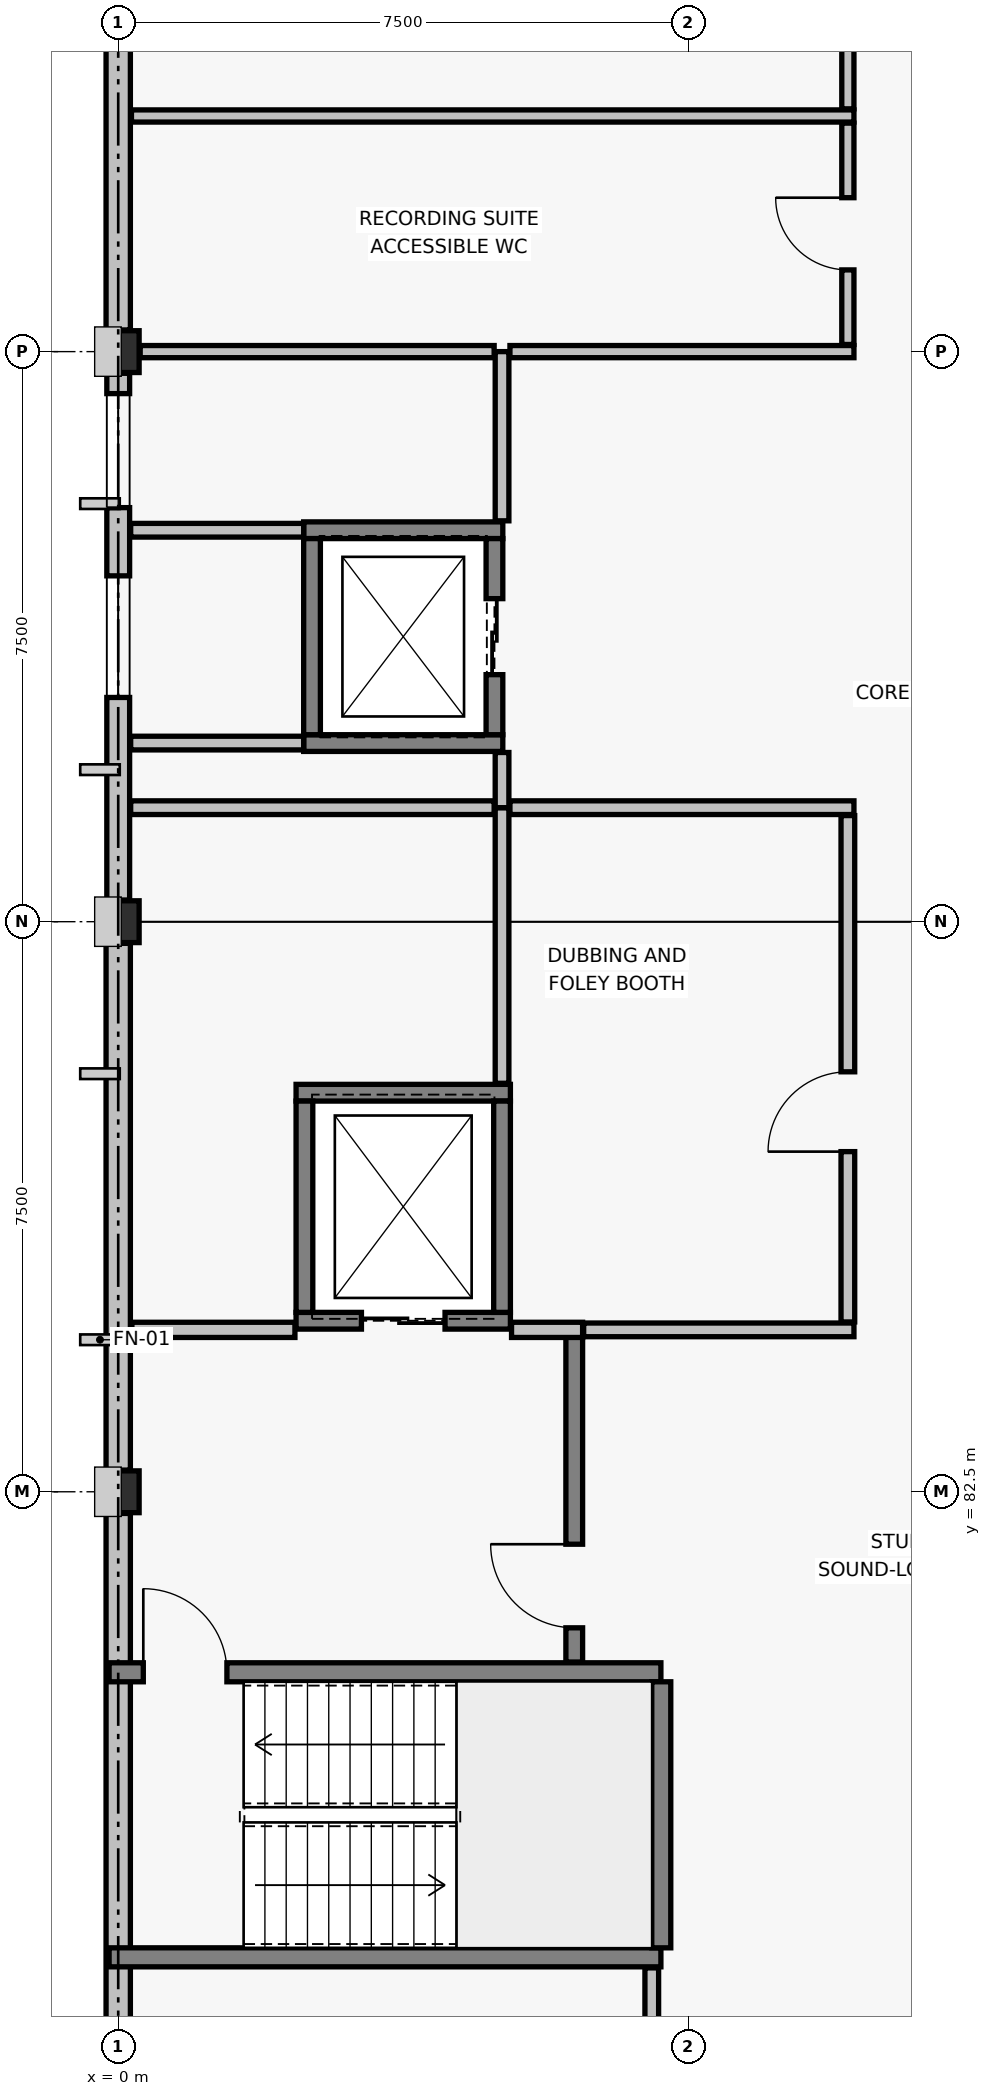
"""IFC4 building model, lengths in metres.
Left out: names, types, materials, properties, quantities, classifications, styles, units other than length and angle.
Written with IfcOpenShell. Run it as: python <this file> out.ifc"""

import sys

from ifc_helpers import new_model, si_unit, direction, frame, frame_2d, origin, origin_2d, place, context, subcontext, project, spatial, rectangle, extrude, element, fill, save


model = new_model("IFC4")
c1 = context("Model", 3, precision=1e-05, world=origin(), true_north=direction((0.0, 1.0)))
c2 = subcontext(c1, "Body", "Model", "MODEL_VIEW")
j1 = project(units=[si_unit("LENGTHUNIT", "METRE"), si_unit("PLANEANGLEUNIT", "RADIAN")], contexts=[c1])
p1 = place(None, origin())
s1 = spatial("IfcSite", under=j1, at=p1, CompositionType="ELEMENT")
p2 = place(p1, origin())
s2 = spatial("IfcBuilding", under=s1, at=p2, CompositionType="ELEMENT")
p3 = place(p2, frame((0.0, 0.0, 13.2)))
s3 = spatial("IfcBuildingStorey", under=s2, at=p3, CompositionType="ELEMENT", Elevation=13.2)
for number, where, z_axis, x_axis in (
    (1, (0.0, 82.5, 0.0), (0.0, 0.0, 1.0), (1.0, 0.0, 0.0)),
    (2, (0.0, 90.0, 0.0), (0.0, 0.0, 1.0), (1.0, 0.0, 0.0)),
    (3, (0.0, 97.5, 0.0), (0.0, 0.0, 1.0), (1.0, 0.0, 0.0)),
):
    element("IfcColumn", number, at=place(p3, frame(where, z_axis=z_axis, x_axis=x_axis)), inside=s3, PredefinedType="COLUMN", context=c2, shape_type="SweptSolid", body=[
        extrude(rectangle(XDim=0.55, YDim=0.55, at=origin_2d()), origin(), (0.0, 0.0, 1.0), 3.9),
    ])
for number, where, z_axis, x_axis in (
    (4, (0.0, 75.285, 0.0), (0.0, 0.0, 1.0), (0.0, 1.0, 0.0)),
    (5, (0.0, 82.785, 0.0), (0.0, 0.0, 1.0), (0.0, 1.0, 0.0)),
):
    element("IfcWall", number, at=place(p3, frame(where, z_axis=z_axis, x_axis=x_axis)), inside=s3, PredefinedType="SOLIDWALL", context=c2, shape_type="SweptSolid", body=[
        extrude(rectangle(XDim=6.93, YDim=0.32, at=frame_2d((3.465, 0.0))), origin(), (0.0, 0.0, 1.0), 2.59),
    ])
p4 = place(p3, frame((0.0, 90.285, 0.0), z_axis=(0.0, 0.0, 1.0), x_axis=(0.0, 1.0, 0.0)))
e6 = element("IfcWall", 6, at=p4, inside=s3, PredefinedType="SOLIDWALL", context=c2, shape_type="SweptSolid", body=[
    extrude(rectangle(XDim=6.93, YDim=0.3, at=frame_2d((3.465, 0.0))), origin(), (0.0, 0.0, 1.0), 2.59),
])
p5 = place(p4, frame((2.665, 0.0, 0.6)))
e7 = element("IfcOpeningElement", 7, at=p5, cuts=e6, PredefinedType="OPENING", context=c2, shape_type="SweptSolid", body=[
    extrude(rectangle(XDim=1.6, YDim=1.3, at=frame_2d((0.8, 0.65))), frame((0.0, 0.16, 0.0), z_axis=(0.0, -1.0, 0.0), x_axis=(1.0, 0.0, 0.0)), (0.0, 0.0, 1.0), 0.32),
])
p6 = place(p4, frame((5.163, 0.0, 0.6)))
e8 = element("IfcOpeningElement", 8, at=p6, cuts=e6, PredefinedType="OPENING", context=c2, shape_type="SweptSolid", body=[
    extrude(rectangle(XDim=1.5, YDim=1.2, at=frame_2d((0.75, 0.6))), frame((0.0, 0.16, 0.0), z_axis=(0.0, -1.0, 0.0), x_axis=(1.0, 0.0, 0.0)), (0.0, 0.0, 1.0), 0.32),
])
p7 = place(p3, frame((0.0, 97.785, 0.0), z_axis=(0.0, 0.0, 1.0), x_axis=(0.0, 1.0, 0.0)))
e9 = element("IfcWall", 9, at=p7, inside=s3, PredefinedType="SOLIDWALL", context=c2, shape_type="SweptSolid", body=[
    extrude(rectangle(XDim=6.93, YDim=0.32, at=frame_2d((3.465, 0.0))), origin(), (0.0, 0.0, 1.0), 2.59),
])
p8 = place(p3, frame((-0.12, 76.375, 0.0), z_axis=(0.0, 0.0, 1.0), x_axis=(1.0, 0.0, 0.0)))
e10 = element("IfcWall", 10, at=p8, inside=s3, PredefinedType="SOLIDWALL", context=c2, shape_type="SweptSolid", body=[
    extrude(rectangle(XDim=7.26, YDim=0.25, at=frame_2d((3.63, 0.0))), origin(), (0.0, 0.0, 1.0), 3.62),
])
p9 = place(p3, frame((-0.12, 80.125, 0.0), z_axis=(0.0, 0.0, 1.0), x_axis=(1.0, 0.0, 0.0)))
e11 = element("IfcWall", 11, at=p9, inside=s3, PredefinedType="SOLIDWALL", context=c2, shape_type="SweptSolid", body=[
    extrude(rectangle(XDim=7.26, YDim=0.25, at=frame_2d((3.63, 0.0))), origin(), (0.0, 0.0, 1.0), 3.62),
])
p10 = place(p9, frame((0.45, 0.0, 0.0)))
e12 = element("IfcOpeningElement", 12, at=p10, cuts=e11, PredefinedType="OPENING", context=c2, shape_type="SweptSolid", body=[
    extrude(rectangle(XDim=1.1, YDim=2.15, at=frame_2d((0.55, 1.075))), frame((0.0, 0.135, 0.0), z_axis=(0.0, -1.0, 0.0), x_axis=(1.0, 0.0, 0.0)), (0.0, 0.0, 1.0), 0.27),
])
p11 = place(p3, frame((7.145, 76.5, 0.0), z_axis=(0.0, 0.0, 1.0), x_axis=(0.0, 1.0, 0.0)))
e13 = element("IfcWall", 13, at=p11, inside=s3, PredefinedType="SOLIDWALL", context=c2, shape_type="SweptSolid", body=[
    extrude(rectangle(XDim=3.5, YDim=0.25, at=frame_2d((1.75, 0.0))), origin(), (0.0, 0.0, 1.0), 3.62),
])
for number, where, z_axis, x_axis in (
    (14, (2.44, 92.35, 0.0), (0.0, 0.0, 1.0), (1.0, 0.0, 0.0)),
    (15, (2.44, 95.15, 0.0), (0.0, 0.0, 1.0), (1.0, 0.0, 0.0)),
):
    element("IfcWall", number, at=place(p3, frame(where, z_axis=z_axis, x_axis=x_axis)), inside=s3, PredefinedType="SOLIDWALL", context=c2, shape_type="SweptSolid", body=[
        extrude(rectangle(XDim=2.62, YDim=0.22, at=frame_2d((1.31, 0.0))), origin(), (0.0, 0.0, 1.0), 3.62),
    ])
p12 = place(p3, frame((2.55, 92.46, 0.0), z_axis=(0.0, 0.0, 1.0), x_axis=(0.0, 1.0, 0.0)))
e16 = element("IfcWall", 16, at=p12, inside=s3, PredefinedType="SOLIDWALL", context=c2, shape_type="SweptSolid", body=[
    extrude(rectangle(XDim=2.58, YDim=0.22, at=frame_2d((1.29, 0.0))), origin(), (0.0, 0.0, 1.0), 3.62),
])
p13 = place(p3, frame((4.95, 92.46, 0.0), z_axis=(0.0, 0.0, 1.0), x_axis=(0.0, 1.0, 0.0)))
e17 = element("IfcWall", 17, at=p13, inside=s3, PredefinedType="SOLIDWALL", context=c2, shape_type="SweptSolid", body=[
    extrude(rectangle(XDim=2.58, YDim=0.22, at=frame_2d((1.29, 0.0))), origin(), (0.0, 0.0, 1.0), 3.62),
])
p14 = place(p13, frame((0.79, 0.0, 0.0)))
e18 = element("IfcOpeningElement", 18, at=p14, cuts=e17, PredefinedType="OPENING", context=c2, shape_type="SweptSolid", body=[
    extrude(rectangle(XDim=1.0, YDim=2.15, at=frame_2d((0.5, 1.075))), frame((0.0, 0.12, 0.0), z_axis=(0.0, -1.0, 0.0), x_axis=(1.0, 0.0, 0.0)), (0.0, 0.0, 1.0), 0.24),
])
p15 = place(p3, frame((2.34, 84.75, 0.0), z_axis=(0.0, 0.0, 1.0), x_axis=(1.0, 0.0, 0.0)))
e19 = element("IfcWall", 19, at=p15, inside=s3, PredefinedType="SOLIDWALL", context=c2, shape_type="SweptSolid", body=[
    extrude(rectangle(XDim=2.82, YDim=0.22, at=frame_2d((1.41, 0.0))), origin(), (0.0, 0.0, 1.0), 3.62),
])
p16 = place(p15, frame((0.86, 0.0, 0.0)))
e20 = element("IfcOpeningElement", 20, at=p16, cuts=e19, PredefinedType="OPENING", context=c2, shape_type="SweptSolid", body=[
    extrude(rectangle(XDim=1.1, YDim=2.15, at=frame_2d((0.55, 1.075))), frame((0.0, 0.12, 0.0), z_axis=(0.0, -1.0, 0.0), x_axis=(1.0, 0.0, 0.0)), (0.0, 0.0, 1.0), 0.24),
])
p17 = place(p3, frame((2.34, 87.75, 0.0), z_axis=(0.0, 0.0, 1.0), x_axis=(1.0, 0.0, 0.0)))
e21 = element("IfcWall", 21, at=p17, inside=s3, PredefinedType="SOLIDWALL", context=c2, shape_type="SweptSolid", body=[
    extrude(rectangle(XDim=2.82, YDim=0.22, at=frame_2d((1.41, 0.0))), origin(), (0.0, 0.0, 1.0), 3.62),
])
for number, where, z_axis, x_axis in (
    (22, (2.45, 84.86, 0.0), (0.0, 0.0, 1.0), (0.0, 1.0, 0.0)),
    (23, (5.05, 84.86, 0.0), (0.0, 0.0, 1.0), (0.0, 1.0, 0.0)),
):
    element("IfcWall", number, at=place(p3, frame(where, z_axis=z_axis, x_axis=x_axis)), inside=s3, PredefinedType="SOLIDWALL", context=c2, shape_type="SweptSolid", body=[
        extrude(rectangle(XDim=2.78, YDim=0.22, at=frame_2d((1.39, 0.0))), origin(), (0.0, 0.0, 1.0), 3.62),
    ])
p18 = place(p3, frame((6.0, 80.26, 0.0), z_axis=(0.0, 0.0, 1.0), x_axis=(0.0, 1.0, 0.0)))
e24 = element("IfcWall", 24, at=p18, inside=s3, PredefinedType="SOLIDWALL", context=c2, shape_type="SweptSolid", body=[
    extrude(rectangle(XDim=4.37, YDim=0.22, at=frame_2d((2.185, 0.0))), origin(), (0.0, 0.0, 1.0), 3.62),
])
p19 = place(p18, frame((0.45, 0.0, 0.0)))
e25 = element("IfcOpeningElement", 25, at=p19, cuts=e24, PredefinedType="OPENING", context=c2, shape_type="SweptSolid", body=[
    extrude(rectangle(XDim=1.1, YDim=2.15, at=frame_2d((0.55, 1.075))), frame((0.0, 0.12, 0.0), z_axis=(0.0, -1.0, 0.0), x_axis=(1.0, 0.0, 0.0)), (0.0, 0.0, 1.0), 0.24),
])
p20 = place(p3, frame((0.18, 84.63, 0.0), z_axis=(0.0, 0.0, 1.0), x_axis=(1.0, 0.0, 0.0)))
e26 = element("IfcWall", 26, at=p20, inside=s3, PredefinedType="PARTITIONING", context=c2, shape_type="SweptSolid", body=[
    extrude(rectangle(XDim=2.145, YDim=0.2, at=frame_2d((1.073, 0.0))), origin(), (0.0, 0.0, 1.0), 2.85),
])
p21 = place(p3, frame((5.175, 84.63, 0.0), z_axis=(0.0, 0.0, 1.0), x_axis=(1.0, 0.0, 0.0)))
e27 = element("IfcWall", 27, at=p21, inside=s3, PredefinedType="PARTITIONING", context=c2, shape_type="SweptSolid", body=[
    extrude(rectangle(XDim=0.935, YDim=0.2, at=frame_2d((0.468, 0.0))), origin(), (0.0, 0.0, 1.0), 3.05),
])
p22 = place(p3, frame((7.02, 75.0, 0.0), z_axis=(0.0, 0.0, 1.0), x_axis=(0.0, 1.0, 0.0)))
e28 = element("IfcWall", 28, at=p22, inside=s3, PredefinedType="PARTITIONING", context=c2, shape_type="SweptSolid", body=[
    extrude(rectangle(XDim=1.236, YDim=0.18, at=frame_2d((0.618, 0.0))), origin(), (0.0, 0.0, 1.0), 2.59),
])
p23 = place(p3, frame((5.05, 87.874, 0.0), z_axis=(0.0, 0.0, 1.0), x_axis=(0.0, 1.0, 0.0)))
e29 = element("IfcWall", 29, at=p23, inside=s3, PredefinedType="PARTITIONING", context=c2, shape_type="SweptSolid", body=[
    extrude(rectangle(XDim=3.626, YDim=0.18, at=frame_2d((1.813, 0.0))), origin(), (0.0, 0.0, 1.0), 2.59),
])
p24 = place(p3, frame((6.124, 84.63, 0.0), z_axis=(0.0, 0.0, 1.0), x_axis=(1.0, 0.0, 0.0)))
e30 = element("IfcWall", 30, at=p24, inside=s3, PredefinedType="PARTITIONING", context=c2, shape_type="SweptSolid", body=[
    extrude(rectangle(XDim=3.556, YDim=0.18, at=frame_2d((1.778, 0.0))), origin(), (0.0, 0.0, 1.0), 2.97),
])
p25 = place(p3, frame((0.164, 91.5, 0.0), z_axis=(0.0, 0.0, 1.0), x_axis=(1.0, 0.0, 0.0)))
e31 = element("IfcWall", 31, at=p25, inside=s3, PredefinedType="PARTITIONING", context=c2, shape_type="SweptSolid", body=[
    extrude(rectangle(XDim=4.782, YDim=0.18, at=frame_2d((2.391, 0.0))), origin(), (0.0, 0.0, 1.0), 2.84),
])
p26 = place(p3, frame((5.154, 91.5, 0.0), z_axis=(0.0, 0.0, 1.0), x_axis=(1.0, 0.0, 0.0)))
e32 = element("IfcWall", 32, at=p26, inside=s3, PredefinedType="PARTITIONING", context=c2, shape_type="SweptSolid", body=[
    extrude(rectangle(XDim=4.526, YDim=0.18, at=frame_2d((2.263, 0.0))), origin(), (0.0, 0.0, 1.0), 2.97),
])
p27 = place(p3, frame((9.6, 84.734, 0.0), z_axis=(0.0, 0.0, 1.0), x_axis=(0.0, 1.0, 0.0)))
e33 = element("IfcWall", 33, at=p27, inside=s3, PredefinedType="PARTITIONING", context=c2, shape_type="SweptSolid", body=[
    extrude(rectangle(XDim=6.662, YDim=0.18, at=frame_2d((3.331, 0.0))), origin(), (0.0, 0.0, 1.0), 2.59),
])
p28 = place(p27, frame((2.241, 0.0, 0.0)))
e34 = element("IfcOpeningElement", 34, at=p28, cuts=e33, PredefinedType="OPENING", context=c2, shape_type="SweptSolid", body=[
    extrude(rectangle(XDim=1.05, YDim=2.12, at=frame_2d((0.525, 1.06))), frame((0.0, 0.1, 0.0), z_axis=(0.0, -1.0, 0.0), x_axis=(1.0, 0.0, 0.0)), (0.0, 0.0, 1.0), 0.2),
])
for number, where, z_axis, x_axis in (
    (35, (0.164, 92.35, 0.0), (0.0, 0.0, 1.0), (1.0, 0.0, 0.0)),
    (36, (0.164, 95.15, 0.0), (0.0, 0.0, 1.0), (1.0, 0.0, 0.0)),
):
    element("IfcWall", number, at=place(p3, frame(where, z_axis=z_axis, x_axis=x_axis)), inside=s3, PredefinedType="PARTITIONING", context=c2, shape_type="SweptSolid", body=[
        extrude(rectangle(XDim=2.276, YDim=0.18, at=frame_2d((1.138, 0.0))), origin(), (0.0, 0.0, 1.0), 2.84),
    ])
p29 = place(p3, frame((5.05, 91.5, 0.0), z_axis=(0.0, 0.0, 1.0), x_axis=(0.0, 1.0, 0.0)))
e37 = element("IfcWall", 37, at=p29, inside=s3, PredefinedType="PARTITIONING", context=c2, shape_type="SweptSolid", body=[
    extrude(rectangle(XDim=0.726, YDim=0.18, at=frame_2d((0.363, 0.0))), origin(), (0.0, 0.0, 1.0), 2.97),
])
p30 = place(p3, frame((5.05, 95.274, 0.0), z_axis=(0.0, 0.0, 1.0), x_axis=(0.0, 1.0, 0.0)))
e38 = element("IfcWall", 38, at=p30, inside=s3, PredefinedType="PARTITIONING", context=c2, shape_type="SweptSolid", body=[
    extrude(rectangle(XDim=2.226, YDim=0.18, at=frame_2d((1.113, 0.0))), origin(), (0.0, 0.0, 1.0), 2.59),
])
p31 = place(p3, frame((0.289, 97.5, 0.0), z_axis=(0.0, 0.0, 1.0), x_axis=(1.0, 0.0, 0.0)))
e39 = element("IfcWall", 39, at=p31, inside=s3, PredefinedType="PARTITIONING", context=c2, shape_type="SweptSolid", body=[
    extrude(rectangle(XDim=4.657, YDim=0.16, at=frame_2d((2.329, 0.0))), origin(), (0.0, 0.0, 1.0), 2.59),
])
p32 = place(p3, frame((5.154, 97.5, 0.0), z_axis=(0.0, 0.0, 1.0), x_axis=(1.0, 0.0, 0.0)))
e40 = element("IfcWall", 40, at=p32, inside=s3, PredefinedType="PARTITIONING", context=c2, shape_type="SweptSolid", body=[
    extrude(rectangle(XDim=4.526, YDim=0.16, at=frame_2d((2.263, 0.0))), origin(), (0.0, 0.0, 1.0), 2.59),
])
p33 = place(p3, frame((0.174, 100.6, 0.0), z_axis=(0.0, 0.0, 1.0), x_axis=(1.0, 0.0, 0.0)))
e41 = element("IfcWall", 41, at=p33, inside=s3, PredefinedType="PARTITIONING", context=c2, shape_type="SweptSolid", body=[
    extrude(rectangle(XDim=9.506, YDim=0.16, at=frame_2d((4.753, 0.0))), origin(), (0.0, 0.0, 1.0), 2.97),
])
p34 = place(p3, frame((9.6, 97.594, 0.0), z_axis=(0.0, 0.0, 1.0), x_axis=(0.0, 1.0, 0.0)))
e42 = element("IfcWall", 42, at=p34, inside=s3, PredefinedType="PARTITIONING", context=c2, shape_type="SweptSolid", body=[
    extrude(rectangle(XDim=2.912, YDim=0.16, at=frame_2d((1.456, 0.0))), origin(), (0.0, 0.0, 1.0), 2.59),
])
p35 = place(p34, frame((0.981, 0.0, 0.0)))
e43 = element("IfcOpeningElement", 43, at=p35, cuts=e42, PredefinedType="OPENING", context=c2, shape_type="SweptSolid", body=[
    extrude(rectangle(XDim=0.95, YDim=2.1, at=frame_2d((0.475, 1.05))), frame((0.0, 0.09, 0.0), z_axis=(0.0, -1.0, 0.0), x_axis=(1.0, 0.0, 0.0)), (0.0, 0.0, 1.0), 0.18),
])
p36 = place(p3, frame((9.6, 100.694, 0.0), z_axis=(0.0, 0.0, 1.0), x_axis=(0.0, 1.0, 0.0)))
e44 = element("IfcWall", 44, at=p36, inside=s3, PredefinedType="PARTITIONING", context=c2, shape_type="SweptSolid", body=[
    extrude(rectangle(XDim=11.642, YDim=0.16, at=frame_2d((5.821, 0.0))), origin(), (0.0, 0.0, 1.0), 2.59),
])
p37 = place(p36, frame((5.281, 0.0, 0.0)))
e45 = element("IfcOpeningElement", 45, at=p37, cuts=e44, PredefinedType="OPENING", context=c2, shape_type="SweptSolid", body=[
    extrude(rectangle(XDim=1.05, YDim=2.12, at=frame_2d((0.525, 1.06))), frame((0.0, 0.09, 0.0), z_axis=(0.0, -1.0, 0.0), x_axis=(1.0, 0.0, 0.0)), (0.0, 0.0, 1.0), 0.18),
])
p38 = place(p5, origin())
e46 = element("IfcWindow", 46, at=p38, inside=s3, PartitioningType="SINGLE_PANEL", PredefinedType="WINDOW", context=c2, shape_type="SweptSolid", body=[
    extrude(rectangle(XDim=1.6, YDim=1.3, at=frame_2d((0.8, 0.65))), frame((0.0, 0.03, 0.0), z_axis=(0.0, -1.0, 0.0), x_axis=(1.0, 0.0, 0.0)), (0.0, 0.0, 1.0), 0.06),
])
fill(e7, e46)
p39 = place(p6, origin())
e47 = element("IfcWindow", 47, at=p39, inside=s3, PartitioningType="SINGLE_PANEL", PredefinedType="WINDOW", context=c2, shape_type="SweptSolid", body=[
    extrude(rectangle(XDim=1.5, YDim=1.2, at=frame_2d((0.75, 0.6))), frame((0.0, 0.03, 0.0), z_axis=(0.0, -1.0, 0.0), x_axis=(1.0, 0.0, 0.0)), (0.0, 0.0, 1.0), 0.06),
])
fill(e8, e47)
p40 = place(p10, origin())
e48 = element("IfcDoor", 48, at=p40, inside=s3, OperationType="SINGLE_SWING_LEFT", PredefinedType="DOOR", context=c2, shape_type="SweptSolid", body=[
    extrude(rectangle(XDim=1.1, YDim=2.15, at=frame_2d((0.55, 1.075))), frame((0.0, 0.025, 0.0), z_axis=(0.0, -1.0, 0.0), x_axis=(1.0, 0.0, 0.0)), (0.0, 0.0, 1.0), 0.05),
])
fill(e12, e48)
p41 = place(p14, origin())
e49 = element("IfcDoor", 49, at=p41, inside=s3, OperationType="SLIDING_TO_LEFT", PredefinedType="DOOR", context=c2, shape_type="SweptSolid", body=[
    extrude(rectangle(XDim=1.0, YDim=2.15, at=frame_2d((0.5, 1.075))), frame((0.0, 0.025, 0.0), z_axis=(0.0, -1.0, 0.0), x_axis=(1.0, 0.0, 0.0)), (0.0, 0.0, 1.0), 0.05),
])
fill(e18, e49)
p42 = place(p16, origin())
e50 = element("IfcDoor", 50, at=p42, inside=s3, OperationType="SLIDING_TO_LEFT", PredefinedType="DOOR", context=c2, shape_type="SweptSolid", body=[
    extrude(rectangle(XDim=1.1, YDim=2.15, at=frame_2d((0.55, 1.075))), frame((0.0, 0.025, 0.0), z_axis=(0.0, -1.0, 0.0), x_axis=(1.0, 0.0, 0.0)), (0.0, 0.0, 1.0), 0.05),
])
fill(e20, e50)
p43 = place(p19, origin())
e51 = element("IfcDoor", 51, at=p43, inside=s3, OperationType="SINGLE_SWING_RIGHT", PredefinedType="DOOR", context=c2, shape_type="SweptSolid", body=[
    extrude(rectangle(XDim=1.1, YDim=2.15, at=frame_2d((0.55, 1.075))), frame((0.0, 0.025, 0.0), z_axis=(0.0, -1.0, 0.0), x_axis=(1.0, 0.0, 0.0)), (0.0, 0.0, 1.0), 0.05),
])
fill(e25, e51)
p44 = place(p28, origin())
e52 = element("IfcDoor", 52, at=p44, inside=s3, OperationType="SINGLE_SWING_LEFT", PredefinedType="DOOR", context=c2, shape_type="SweptSolid", body=[
    extrude(rectangle(XDim=1.05, YDim=2.12, at=frame_2d((0.525, 1.06))), frame((0.0, 0.025, 0.0), z_axis=(0.0, -1.0, 0.0), x_axis=(1.0, 0.0, 0.0)), (0.0, 0.0, 1.0), 0.05),
])
fill(e34, e52)
p45 = place(p35, origin())
e53 = element("IfcDoor", 53, at=p45, inside=s3, OperationType="SINGLE_SWING_RIGHT", PredefinedType="DOOR", context=c2, shape_type="SweptSolid", body=[
    extrude(rectangle(XDim=0.95, YDim=2.1, at=frame_2d((0.475, 1.05))), frame((0.0, 0.025, 0.0), z_axis=(0.0, -1.0, 0.0), x_axis=(1.0, 0.0, 0.0)), (0.0, 0.0, 1.0), 0.05),
])
fill(e43, e53)
save(model, sys.argv[1])
